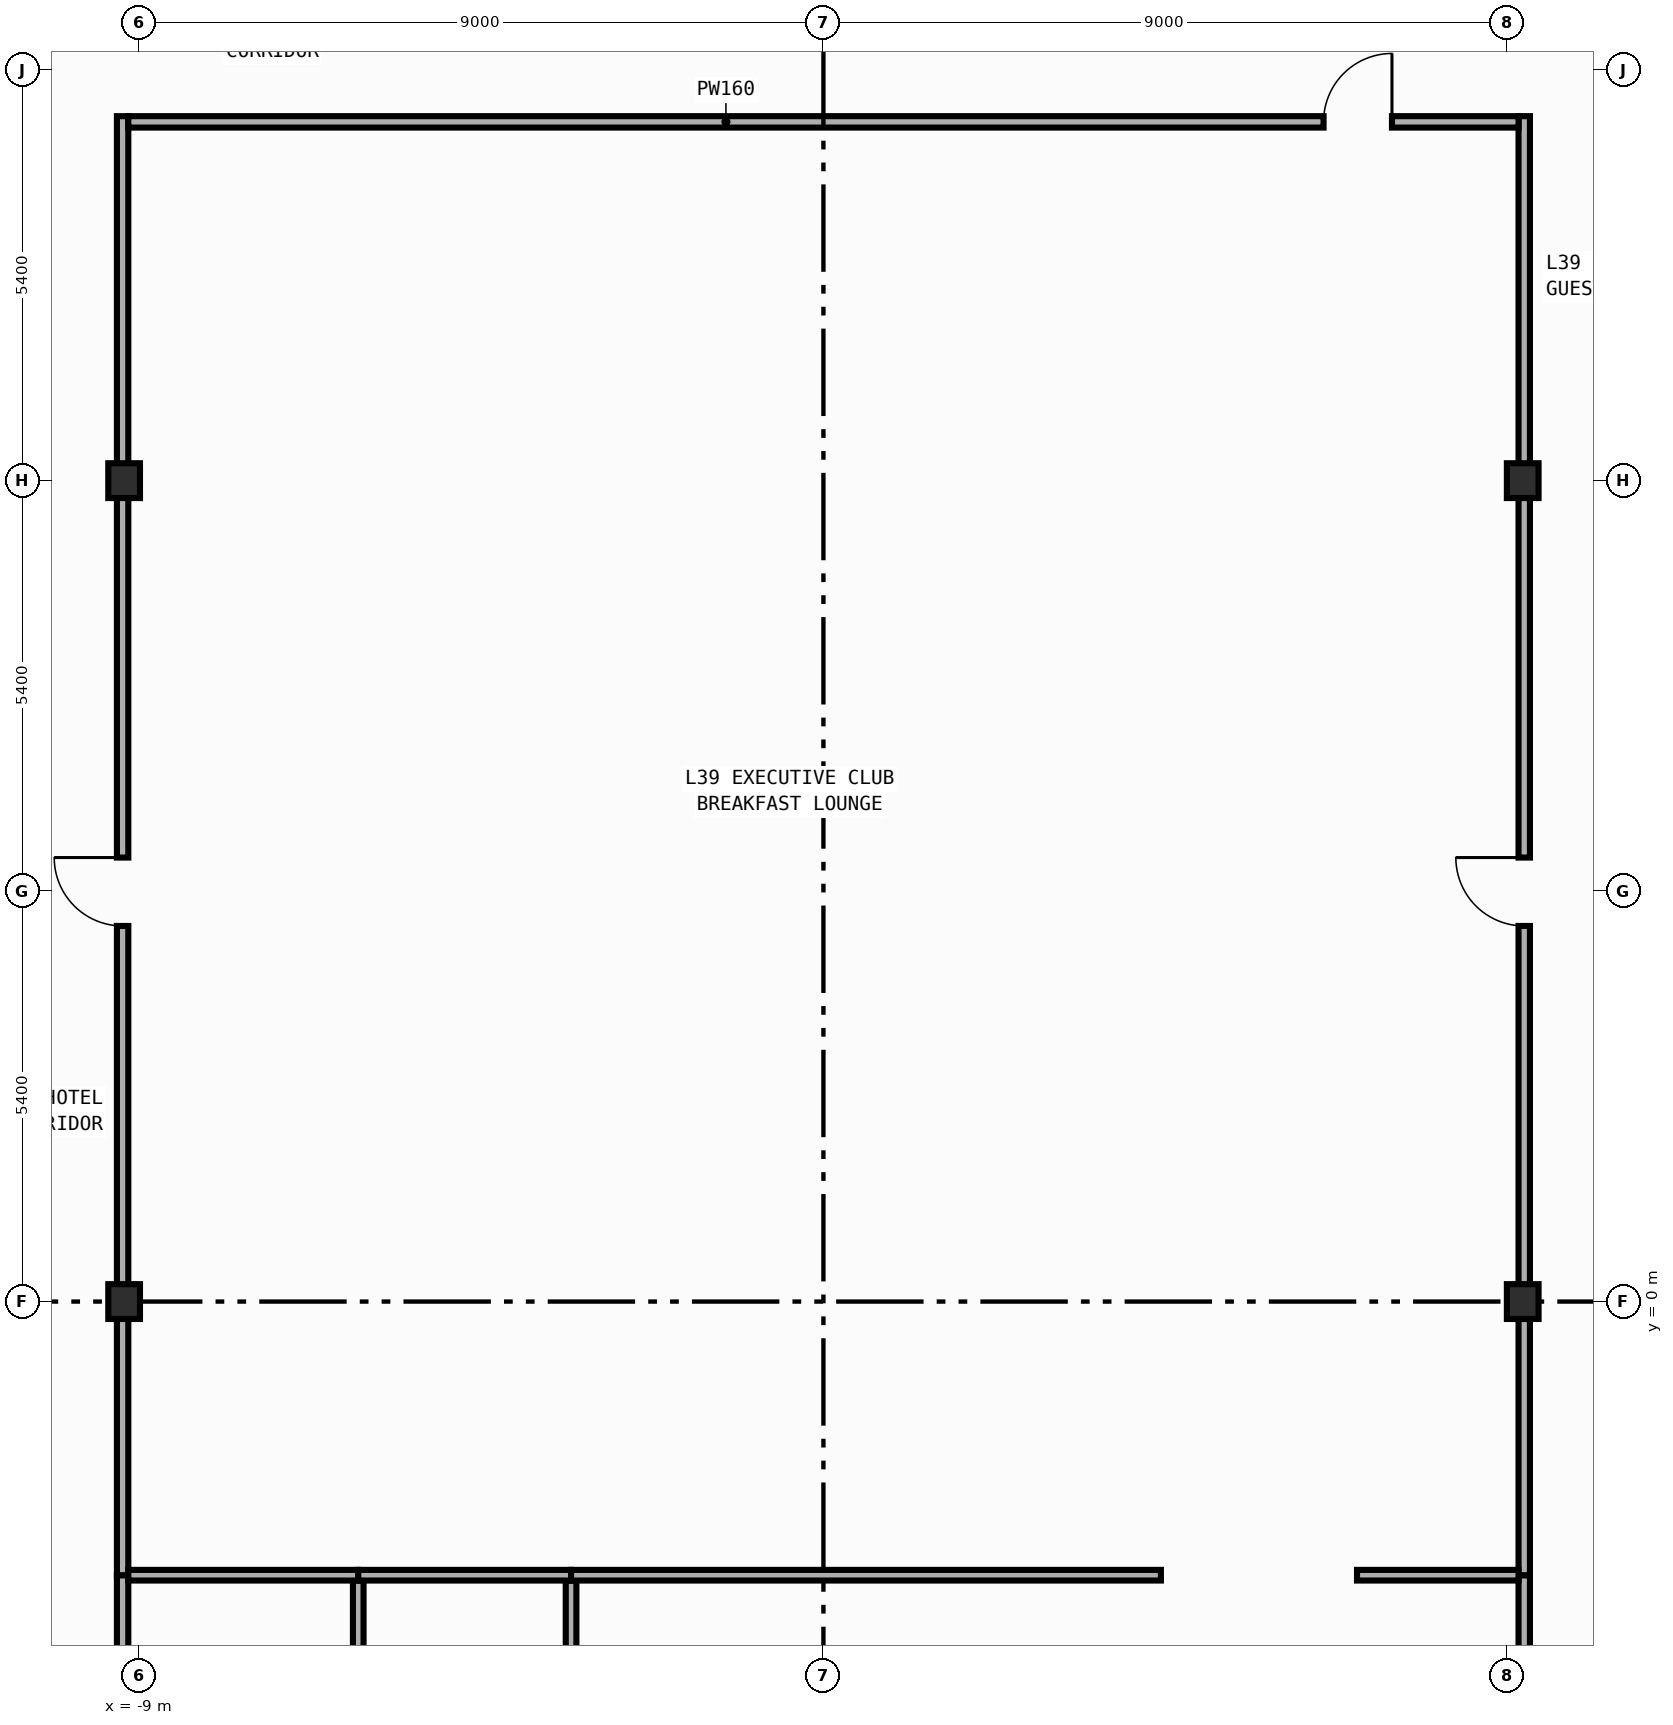
"""IFC4 building model, lengths in metres.
Left out: names, types, materials, properties, quantities, classifications, styles, units other than length and angle.
Written with IfcOpenShell. Run it as: python <this file> out.ifc"""

import sys

from ifc_helpers import new_model, si_unit, direction, frame, frame_2d, origin, origin_2d, place, context, subcontext, project, spatial, rectangle, i_section, extrude, element, fill, save


model = new_model("IFC4")
c1 = context("Model", 3, precision=1e-05, world=origin(), true_north=direction((0.0, 1.0)))
c2 = subcontext(c1, "Body", "Model", "MODEL_VIEW")
j1 = project(units=[si_unit("LENGTHUNIT", "METRE"), si_unit("PLANEANGLEUNIT", "RADIAN")], contexts=[c1])
p1 = place(None, origin())
s1 = spatial("IfcSite", under=j1, at=p1, CompositionType="ELEMENT")
p2 = place(p1, origin())
s2 = spatial("IfcBuilding", under=s1, at=p2, CompositionType="ELEMENT")
p3 = place(p2, frame((0.0, 0.0, 172.6)))
s3 = spatial("IfcBuildingStorey", under=s2, at=p3, CompositionType="ELEMENT", Elevation=172.6)
for number, where, z_axis, x_axis in (
    (1, (-9.2, 0.0, 0.0), (0.0, 0.0, 1.0), (1.0, 0.0, 0.0)),
    (2, (-9.2, 10.8, 0.0), (0.0, 0.0, 1.0), (1.0, 0.0, 0.0)),
    (3, (9.2, 0.0, 0.0), (0.0, 0.0, 1.0), (1.0, 0.0, 0.0)),
    (4, (9.2, 10.8, 0.0), (0.0, 0.0, 1.0), (1.0, 0.0, 0.0)),
):
    element("IfcColumn", number, at=place(p3, frame(where, z_axis=z_axis, x_axis=x_axis)), inside=s3, PredefinedType="COLUMN", context=c2, shape_type="SweptSolid", body=[
        extrude(i_section(OverallWidth=0.417, OverallDepth=0.458, WebThickness=0.03, FlangeThickness=0.05, FilletRadius=0.022, at=origin_2d()), origin(), (0.0, 0.0, 1.0), 3.8),
    ])
p4 = place(p3, frame((-9.22, -14.195, 0.0), z_axis=(0.0, 0.0, 1.0), x_axis=(0.0, 1.0, 0.0)))
e5 = element("IfcWall", 5, at=p4, inside=s3, PredefinedType="PARTITIONING", context=c2, shape_type="SweptSolid", body=[
    extrude(rectangle(XDim=10.595, YDim=0.15, at=frame_2d((5.297, 0.0))), origin(), (0.0, 0.0, 1.0), 2.952),
])
p5 = place(p4, frame((8.419, 0.0, 0.0)))
e6 = element("IfcOpeningElement", 6, at=p5, cuts=e5, PredefinedType="OPENING", context=c2, shape_type="SweptSolid", body=[
    extrude(rectangle(XDim=0.9, YDim=2.15, at=frame_2d((0.45, 1.075))), frame((0.0, 0.085, 0.0), z_axis=(0.0, -1.0, 0.0), x_axis=(1.0, 0.0, 0.0)), (0.0, 0.0, 1.0), 0.17),
])
p6 = place(p3, frame((-9.22, -3.6, 0.0), z_axis=(0.0, 0.0, 1.0), x_axis=(0.0, 1.0, 0.0)))
e7 = element("IfcWall", 7, at=p6, inside=s3, PredefinedType="PARTITIONING", context=c2, shape_type="SweptSolid", body=[
    extrude(rectangle(XDim=19.195, YDim=0.15, at=frame_2d((9.598, 0.0))), origin(), (0.0, 0.0, 1.0), 2.952),
])
p7 = place(p6, frame((8.542, 0.0, 0.0)))
e8 = element("IfcOpeningElement", 8, at=p7, cuts=e7, PredefinedType="OPENING", context=c2, shape_type="SweptSolid", body=[
    extrude(rectangle(XDim=0.9, YDim=2.15, at=frame_2d((0.45, 1.075))), frame((0.0, 0.085, 0.0), z_axis=(0.0, -1.0, 0.0), x_axis=(1.0, 0.0, 0.0)), (0.0, 0.0, 1.0), 0.17),
])
p8 = place(p3, frame((9.22, -14.195, 0.0), z_axis=(0.0, 0.0, 1.0), x_axis=(0.0, 1.0, 0.0)))
e9 = element("IfcWall", 9, at=p8, inside=s3, PredefinedType="PARTITIONING", context=c2, shape_type="SweptSolid", body=[
    extrude(rectangle(XDim=10.595, YDim=0.15, at=frame_2d((5.297, 0.0))), origin(), (0.0, 0.0, 1.0), 2.952),
])
p9 = place(p8, frame((8.419, 0.0, 0.0)))
e10 = element("IfcOpeningElement", 10, at=p9, cuts=e9, PredefinedType="OPENING", context=c2, shape_type="SweptSolid", body=[
    extrude(rectangle(XDim=0.9, YDim=2.15, at=frame_2d((0.45, 1.075))), frame((0.0, 0.085, 0.0), z_axis=(0.0, -1.0, 0.0), x_axis=(1.0, 0.0, 0.0)), (0.0, 0.0, 1.0), 0.17),
])
p10 = place(p3, frame((9.22, -3.6, 0.0), z_axis=(0.0, 0.0, 1.0), x_axis=(0.0, 1.0, 0.0)))
e11 = element("IfcWall", 11, at=p10, inside=s3, PredefinedType="PARTITIONING", context=c2, shape_type="SweptSolid", body=[
    extrude(rectangle(XDim=19.195, YDim=0.15, at=frame_2d((9.598, 0.0))), origin(), (0.0, 0.0, 1.0), 2.952),
])
p11 = place(p10, frame((8.542, 0.0, 0.0)))
e12 = element("IfcOpeningElement", 12, at=p11, cuts=e11, PredefinedType="OPENING", context=c2, shape_type="SweptSolid", body=[
    extrude(rectangle(XDim=0.9, YDim=2.15, at=frame_2d((0.45, 1.075))), frame((0.0, 0.085, 0.0), z_axis=(0.0, -1.0, 0.0), x_axis=(1.0, 0.0, 0.0)), (0.0, 0.0, 1.0), 0.17),
])
p12 = place(p3, frame((-9.145, 15.52, 0.0), z_axis=(0.0, 0.0, 1.0), x_axis=(1.0, 0.0, 0.0)))
e13 = element("IfcWall", 13, at=p12, inside=s3, PredefinedType="PARTITIONING", context=c2, shape_type="SweptSolid", body=[
    extrude(rectangle(XDim=18.29, YDim=0.15, at=frame_2d((9.145, 0.0))), origin(), (0.0, 0.0, 1.0), 3.54),
])
p13 = place(p12, frame((15.725, 0.0, 0.0)))
e14 = element("IfcOpeningElement", 14, at=p13, cuts=e13, PredefinedType="OPENING", context=c2, shape_type="SweptSolid", body=[
    extrude(rectangle(XDim=0.9, YDim=2.15, at=frame_2d((0.45, 1.075))), frame((0.0, 0.085, 0.0), z_axis=(0.0, -1.0, 0.0), x_axis=(1.0, 0.0, 0.0)), (0.0, 0.0, 1.0), 0.17),
])
p14 = place(p3, frame((-6.12, -14.045, 0.0), z_axis=(0.0, 0.0, 1.0), x_axis=(0.0, 1.0, 0.0)))
e15 = element("IfcWall", 15, at=p14, inside=s3, PredefinedType="PARTITIONING", context=c2, shape_type="SweptSolid", body=[
    extrude(rectangle(XDim=10.375, YDim=0.14, at=frame_2d((5.188, 0.0))), origin(), (0.0, 0.0, 1.0), 3.54),
])
p15 = place(p3, frame((-9.145, -3.6, 0.0), z_axis=(0.0, 0.0, 1.0), x_axis=(1.0, 0.0, 0.0)))
e16 = element("IfcWall", 16, at=p15, inside=s3, PredefinedType="PARTITIONING", context=c2, shape_type="SweptSolid", body=[
    extrude(rectangle(XDim=3.025, YDim=0.14, at=frame_2d((1.512, 0.0))), origin(), (0.0, 0.0, 1.0), 3.54),
])
p16 = place(p3, frame((-3.32, -14.045, 0.0), z_axis=(0.0, 0.0, 1.0), x_axis=(0.0, 1.0, 0.0)))
e17 = element("IfcWall", 17, at=p16, inside=s3, PredefinedType="PARTITIONING", context=c2, shape_type="SweptSolid", body=[
    extrude(rectangle(XDim=10.375, YDim=0.14, at=frame_2d((5.188, 0.0))), origin(), (0.0, 0.0, 1.0), 3.54),
])
p17 = place(p3, frame((-6.12, -3.6, 0.0), z_axis=(0.0, 0.0, 1.0), x_axis=(1.0, 0.0, 0.0)))
e18 = element("IfcWall", 18, at=p17, inside=s3, PredefinedType="PARTITIONING", context=c2, shape_type="SweptSolid", body=[
    extrude(rectangle(XDim=2.8, YDim=0.14, at=frame_2d((1.4, 0.0))), origin(), (0.0, 0.0, 1.0), 3.54),
])
p18 = place(p3, frame((-3.32, -3.6, 0.0), z_axis=(0.0, 0.0, 1.0), x_axis=(1.0, 0.0, 0.0)))
e19 = element("IfcWall", 19, at=p18, inside=s3, PredefinedType="PARTITIONING", context=c2, shape_type="SweptSolid", body=[
    extrude(rectangle(XDim=7.76, YDim=0.14, at=frame_2d((3.88, 0.0))), origin(), (0.0, 0.0, 1.0), 3.54),
])
p19 = place(p3, frame((7.02, -3.6, 0.0), z_axis=(0.0, 0.0, 1.0), x_axis=(1.0, 0.0, 0.0)))
e20 = element("IfcWall", 20, at=p19, inside=s3, PredefinedType="PARTITIONING", context=c2, shape_type="SweptSolid", body=[
    extrude(rectangle(XDim=2.125, YDim=0.14, at=frame_2d((1.062, 0.0))), origin(), (0.0, 0.0, 1.0), 3.54),
])
p20 = place(p7, origin())
e21 = element("IfcDoor", 21, at=p20, inside=s3, OperationType="SINGLE_SWING_RIGHT", PredefinedType="DOOR", context=c2, shape_type="SweptSolid", body=[
    extrude(rectangle(XDim=0.9, YDim=2.15, at=frame_2d((0.45, 1.075))), frame((0.0, 0.025, 0.0), z_axis=(0.0, -1.0, 0.0), x_axis=(1.0, 0.0, 0.0)), (0.0, 0.0, 1.0), 0.05),
])
fill(e8, e21)
p21 = place(p11, origin())
e22 = element("IfcDoor", 22, at=p21, inside=s3, OperationType="SINGLE_SWING_RIGHT", PredefinedType="DOOR", context=c2, shape_type="SweptSolid", body=[
    extrude(rectangle(XDim=0.9, YDim=2.15, at=frame_2d((0.45, 1.075))), frame((0.0, 0.025, 0.0), z_axis=(0.0, -1.0, 0.0), x_axis=(1.0, 0.0, 0.0)), (0.0, 0.0, 1.0), 0.05),
])
fill(e12, e22)
p22 = place(p13, origin())
e23 = element("IfcDoor", 23, at=p22, inside=s3, OperationType="SINGLE_SWING_RIGHT", PredefinedType="DOOR", context=c2, shape_type="SweptSolid", body=[
    extrude(rectangle(XDim=0.9, YDim=2.15, at=frame_2d((0.45, 1.075))), frame((0.0, 0.025, 0.0), z_axis=(0.0, -1.0, 0.0), x_axis=(1.0, 0.0, 0.0)), (0.0, 0.0, 1.0), 0.05),
])
fill(e14, e23)
save(model, sys.argv[1])
